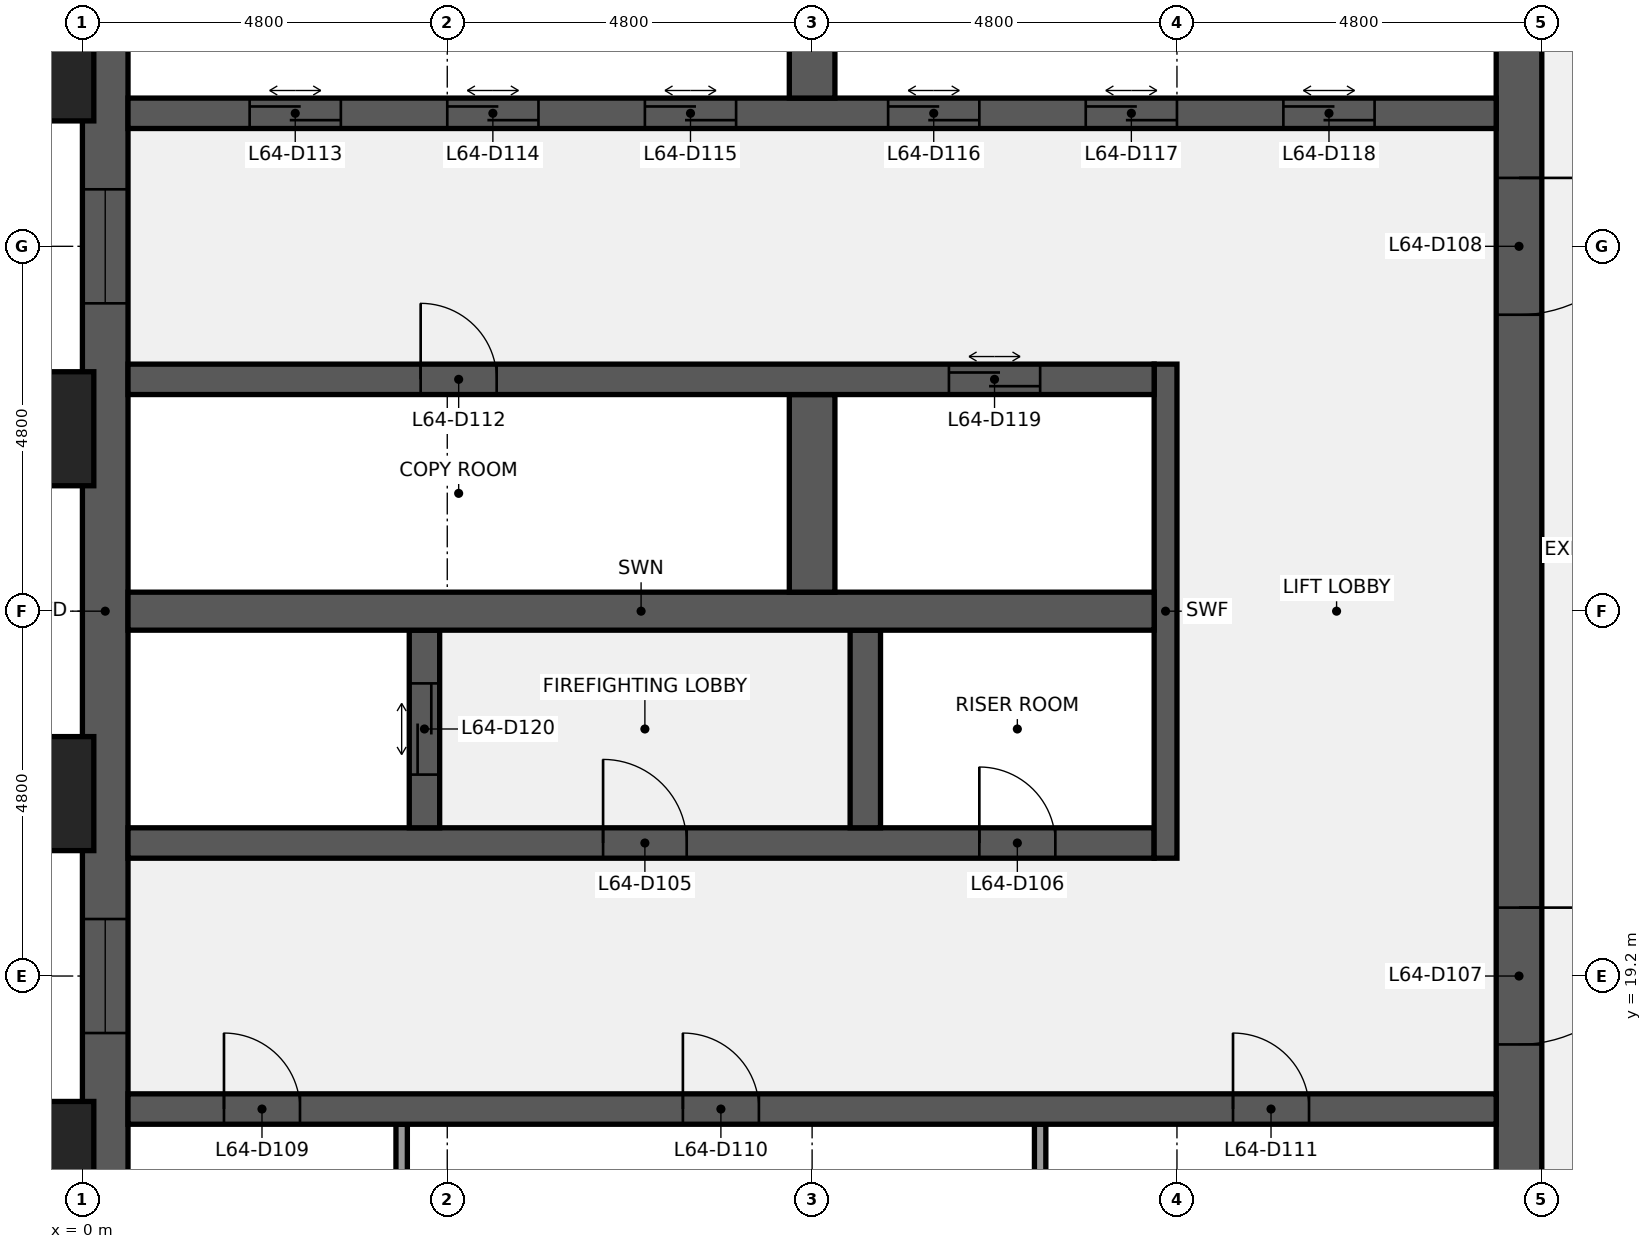
"""IFC4 building model, lengths in metres.
Left out: names, types, materials, properties, quantities, classifications, styles, units other than length and angle.
Written with IfcOpenShell. Run it as: python <this file> out.ifc"""

import sys

from ifc_helpers import new_model, si_unit, direction, frame, frame_2d, origin, origin_2d, place, context, subcontext, project, spatial, rectangle, extrude, element, fill, save


model = new_model("IFC4")
c1 = context("Model", 3, precision=1e-05, world=origin(), true_north=direction((0.0, 1.0)))
c2 = subcontext(c1, "Body", "Model", "MODEL_VIEW")
j1 = project(units=[si_unit("LENGTHUNIT", "METRE"), si_unit("PLANEANGLEUNIT", "RADIAN")], contexts=[c1])
p1 = place(None, origin())
s1 = spatial("IfcSite", under=j1, at=p1, CompositionType="ELEMENT")
p2 = place(p1, origin())
s2 = spatial("IfcBuilding", under=s1, at=p2, CompositionType="ELEMENT")
p3 = place(p2, frame((0.0, 0.0, 294.3)))
s3 = spatial("IfcBuildingStorey", under=s2, at=p3, CompositionType="ELEMENT", Elevation=294.3)
p4 = place(p3, frame((0.3, 9.6, 0.0), z_axis=(0.0, 0.0, 1.0), x_axis=(0.0, 1.0, 0.0)))
e1 = element("IfcWall", 1, at=p4, inside=s3, PredefinedType="SHEAR", context=c2, shape_type="SweptSolid", body=[
    extrude(rectangle(XDim=28.8, YDim=0.6, at=frame_2d((14.4, 0.0))), origin(), (0.0, 0.0, 1.0), 3.84),
])
p5 = place(p4, frame((8.85, 0.0, 0.9)))
e2 = element("IfcOpeningElement", 2, at=p5, cuts=e1, PredefinedType="OPENING", context=c2, shape_type="SweptSolid", body=[
    extrude(rectangle(XDim=1.5, YDim=1.5, at=frame_2d((0.75, 0.75))), frame((0.0, 0.31, 0.0), z_axis=(0.0, -1.0, 0.0), x_axis=(1.0, 0.0, 0.0)), (0.0, 0.0, 1.0), 0.62),
])
p6 = place(p4, frame((18.45, 0.0, 0.9)))
e3 = element("IfcOpeningElement", 3, at=p6, cuts=e1, PredefinedType="OPENING", context=c2, shape_type="SweptSolid", body=[
    extrude(rectangle(XDim=1.5, YDim=1.5, at=frame_2d((0.75, 0.75))), frame((0.0, 0.31, 0.0), z_axis=(0.0, -1.0, 0.0), x_axis=(1.0, 0.0, 0.0)), (0.0, 0.0, 1.0), 0.62),
])
p7 = place(p3, frame((18.9, 38.4, 0.0), z_axis=(0.0, 0.0, 1.0), x_axis=(0.0, -1.0, 0.0)))
e4 = element("IfcWall", 4, at=p7, inside=s3, PredefinedType="SHEAR", context=c2, shape_type="SweptSolid", body=[
    extrude(rectangle(XDim=28.8, YDim=0.6, at=frame_2d((14.4, 0.0))), origin(), (0.0, 0.0, 1.0), 3.84),
])
p8 = place(p7, frame((18.3, 0.0, 0.0)))
e5 = element("IfcOpeningElement", 5, at=p8, cuts=e4, PredefinedType="OPENING", context=c2, shape_type="SweptSolid", body=[
    extrude(rectangle(XDim=1.8, YDim=2.1, at=frame_2d((0.9, 1.05))), frame((0.0, 0.31, 0.0), z_axis=(0.0, -1.0, 0.0), x_axis=(1.0, 0.0, 0.0)), (0.0, 0.0, 1.0), 0.62),
])
p9 = place(p7, frame((8.7, 0.0, 0.0)))
e6 = element("IfcOpeningElement", 6, at=p9, cuts=e4, PredefinedType="OPENING", context=c2, shape_type="SweptSolid", body=[
    extrude(rectangle(XDim=1.8, YDim=2.1, at=frame_2d((0.9, 1.05))), frame((0.0, 0.31, 0.0), z_axis=(0.0, -1.0, 0.0), x_axis=(1.0, 0.0, 0.0)), (0.0, 0.0, 1.0), 0.62),
])
for number, where, z_axis, x_axis in (
    (7, (4.2, 14.65, 0.0), (0.0, 0.0, 1.0), (0.0, 1.0, 0.0)),
    (8, (12.6, 14.65, 0.0), (0.0, 0.0, 1.0), (0.0, 1.0, 0.0)),
):
    element("IfcWall", number, at=place(p3, frame(where, z_axis=z_axis, x_axis=x_axis)), inside=s3, PredefinedType="PARTITIONING", context=c2, shape_type="SweptSolid", body=[
        extrude(rectangle(XDim=2.6, YDim=0.15, at=frame_2d((1.3, 0.0))), origin(), (0.0, 0.0, 1.0), 3.84),
    ])
p10 = place(p3, frame((0.6, 17.45, 0.0), z_axis=(0.0, 0.0, 1.0), x_axis=(1.0, 0.0, 0.0)))
e9 = element("IfcWall", 9, at=p10, inside=s3, PredefinedType="SHEAR", context=c2, shape_type="SweptSolid", body=[
    extrude(rectangle(XDim=18.0, YDim=0.4, at=frame_2d((9.0, 0.0))), origin(), (0.0, 0.0, 1.0), 3.84),
])
p11 = place(p10, frame((1.262, 0.0, 0.0)))
e10 = element("IfcOpeningElement", 10, at=p11, cuts=e9, PredefinedType="OPENING", context=c2, shape_type="SweptSolid", body=[
    extrude(rectangle(XDim=1.0, YDim=2.1, at=frame_2d((0.5, 1.05))), frame((0.0, 0.21, 0.0), z_axis=(0.0, -1.0, 0.0), x_axis=(1.0, 0.0, 0.0)), (0.0, 0.0, 1.0), 0.42),
])
p12 = place(p10, frame((7.3, 0.0, 0.0)))
e11 = element("IfcOpeningElement", 11, at=p12, cuts=e9, PredefinedType="OPENING", context=c2, shape_type="SweptSolid", body=[
    extrude(rectangle(XDim=1.0, YDim=2.1, at=frame_2d((0.5, 1.05))), frame((0.0, 0.21, 0.0), z_axis=(0.0, -1.0, 0.0), x_axis=(1.0, 0.0, 0.0)), (0.0, 0.0, 1.0), 0.42),
])
p13 = place(p10, frame((14.538, 0.0, 0.0)))
e12 = element("IfcOpeningElement", 12, at=p13, cuts=e9, PredefinedType="OPENING", context=c2, shape_type="SweptSolid", body=[
    extrude(rectangle(XDim=1.0, YDim=2.1, at=frame_2d((0.5, 1.05))), frame((0.0, 0.21, 0.0), z_axis=(0.0, -1.0, 0.0), x_axis=(1.0, 0.0, 0.0)), (0.0, 0.0, 1.0), 0.42),
])
p14 = place(p3, frame((0.6, 20.95, 0.0), z_axis=(0.0, 0.0, 1.0), x_axis=(1.0, 0.0, 0.0)))
e13 = element("IfcWall", 13, at=p14, inside=s3, PredefinedType="SHEAR", context=c2, shape_type="SweptSolid", body=[
    extrude(rectangle(XDim=13.5, YDim=0.4, at=frame_2d((6.75, 0.0))), origin(), (0.0, 0.0, 1.0), 3.84),
])
p15 = place(p14, frame((6.25, 0.0, 0.0)))
e14 = element("IfcOpeningElement", 14, at=p15, cuts=e13, PredefinedType="OPENING", context=c2, shape_type="SweptSolid", body=[
    extrude(rectangle(XDim=1.1, YDim=2.1, at=frame_2d((0.55, 1.05))), frame((0.0, 0.21, 0.0), z_axis=(0.0, -1.0, 0.0), x_axis=(1.0, 0.0, 0.0)), (0.0, 0.0, 1.0), 0.42),
])
p16 = place(p14, frame((11.2, 0.0, 0.0)))
e15 = element("IfcOpeningElement", 15, at=p16, cuts=e13, PredefinedType="OPENING", context=c2, shape_type="SweptSolid", body=[
    extrude(rectangle(XDim=1.0, YDim=2.1, at=frame_2d((0.5, 1.05))), frame((0.0, 0.21, 0.0), z_axis=(0.0, -1.0, 0.0), x_axis=(1.0, 0.0, 0.0)), (0.0, 0.0, 1.0), 0.42),
])
p17 = place(p3, frame((14.25, 20.75, 0.0), z_axis=(0.0, 0.0, 1.0), x_axis=(0.0, 1.0, 0.0)))
e16 = element("IfcWall", 16, at=p17, inside=s3, PredefinedType="SHEAR", context=c2, shape_type="SweptSolid", body=[
    extrude(rectangle(XDim=6.5, YDim=0.3, at=frame_2d((3.25, 0.0))), origin(), (0.0, 0.0, 1.0), 3.84),
])
p18 = place(p3, frame((4.5, 21.15, 0.0), z_axis=(0.0, 0.0, 1.0), x_axis=(0.0, 1.0, 0.0)))
e17 = element("IfcWall", 17, at=p18, inside=s3, PredefinedType="SHEAR", context=c2, shape_type="SweptSolid", body=[
    extrude(rectangle(XDim=2.6, YDim=0.4, at=frame_2d((1.3, 0.0))), origin(), (0.0, 0.0, 1.0), 3.84),
])
p19 = place(p18, frame((0.7, 0.0, 0.0)))
e18 = element("IfcOpeningElement", 18, at=p19, cuts=e17, PredefinedType="OPENING", context=c2, shape_type="SweptSolid", body=[
    extrude(rectangle(XDim=1.2, YDim=2.1, at=frame_2d((0.6, 1.05))), frame((0.0, 0.21, 0.0), z_axis=(0.0, -1.0, 0.0), x_axis=(1.0, 0.0, 0.0)), (0.0, 0.0, 1.0), 0.42),
])
p20 = place(p3, frame((10.3, 21.15, 0.0), z_axis=(0.0, 0.0, 1.0), x_axis=(0.0, 1.0, 0.0)))
e19 = element("IfcWall", 19, at=p20, inside=s3, PredefinedType="SHEAR", context=c2, shape_type="SweptSolid", body=[
    extrude(rectangle(XDim=2.6, YDim=0.4, at=frame_2d((1.3, 0.0))), origin(), (0.0, 0.0, 1.0), 3.84),
])
p21 = place(p3, frame((0.6, 24.0, 0.0), z_axis=(0.0, 0.0, 1.0), x_axis=(1.0, 0.0, 0.0)))
e20 = element("IfcWall", 20, at=p21, inside=s3, PredefinedType="SHEAR", context=c2, shape_type="SweptSolid", body=[
    extrude(rectangle(XDim=13.5, YDim=0.5, at=frame_2d((6.75, 0.0))), origin(), (0.0, 0.0, 1.0), 3.84),
])
p22 = place(p3, frame((9.6, 24.25, 0.0), z_axis=(0.0, 0.0, 1.0), x_axis=(0.0, 1.0, 0.0)))
e21 = element("IfcWall", 21, at=p22, inside=s3, PredefinedType="SHEAR", context=c2, shape_type="SweptSolid", body=[
    extrude(rectangle(XDim=2.6, YDim=0.6, at=frame_2d((1.3, 0.0))), origin(), (0.0, 0.0, 1.0), 3.84),
])
p23 = place(p3, frame((0.6, 27.05, 0.0), z_axis=(0.0, 0.0, 1.0), x_axis=(1.0, 0.0, 0.0)))
e22 = element("IfcWall", 22, at=p23, inside=s3, PredefinedType="SHEAR", context=c2, shape_type="SweptSolid", body=[
    extrude(rectangle(XDim=13.5, YDim=0.4, at=frame_2d((6.75, 0.0))), origin(), (0.0, 0.0, 1.0), 3.84),
])
p24 = place(p23, frame((3.85, 0.0, 0.0)))
e23 = element("IfcOpeningElement", 23, at=p24, cuts=e22, PredefinedType="OPENING", context=c2, shape_type="SweptSolid", body=[
    extrude(rectangle(XDim=1.0, YDim=2.1, at=frame_2d((0.5, 1.05))), frame((0.0, 0.21, 0.0), z_axis=(0.0, -1.0, 0.0), x_axis=(1.0, 0.0, 0.0)), (0.0, 0.0, 1.0), 0.42),
])
p25 = place(p23, frame((10.8, 0.0, 0.0)))
e24 = element("IfcOpeningElement", 24, at=p25, cuts=e22, PredefinedType="OPENING", context=c2, shape_type="SweptSolid", body=[
    extrude(rectangle(XDim=1.2, YDim=2.1, at=frame_2d((0.6, 1.05))), frame((0.0, 0.21, 0.0), z_axis=(0.0, -1.0, 0.0), x_axis=(1.0, 0.0, 0.0)), (0.0, 0.0, 1.0), 0.42),
])
p26 = place(p3, frame((0.6, 30.55, 0.0), z_axis=(0.0, 0.0, 1.0), x_axis=(1.0, 0.0, 0.0)))
e25 = element("IfcWall", 25, at=p26, inside=s3, PredefinedType="SHEAR", context=c2, shape_type="SweptSolid", body=[
    extrude(rectangle(XDim=18.0, YDim=0.4, at=frame_2d((9.0, 0.0))), origin(), (0.0, 0.0, 1.0), 3.84),
])
p27 = place(p26, frame((1.6, 0.0, 0.0)))
e26 = element("IfcOpeningElement", 26, at=p27, cuts=e25, PredefinedType="OPENING", context=c2, shape_type="SweptSolid", body=[
    extrude(rectangle(XDim=1.2, YDim=2.1, at=frame_2d((0.6, 1.05))), frame((0.0, 0.21, 0.0), z_axis=(0.0, -1.0, 0.0), x_axis=(1.0, 0.0, 0.0)), (0.0, 0.0, 1.0), 0.42),
])
p28 = place(p26, frame((4.2, 0.0, 0.0)))
e27 = element("IfcOpeningElement", 27, at=p28, cuts=e25, PredefinedType="OPENING", context=c2, shape_type="SweptSolid", body=[
    extrude(rectangle(XDim=1.2, YDim=2.1, at=frame_2d((0.6, 1.05))), frame((0.0, 0.21, 0.0), z_axis=(0.0, -1.0, 0.0), x_axis=(1.0, 0.0, 0.0)), (0.0, 0.0, 1.0), 0.42),
])
p29 = place(p26, frame((6.8, 0.0, 0.0)))
e28 = element("IfcOpeningElement", 28, at=p29, cuts=e25, PredefinedType="OPENING", context=c2, shape_type="SweptSolid", body=[
    extrude(rectangle(XDim=1.2, YDim=2.1, at=frame_2d((0.6, 1.05))), frame((0.0, 0.21, 0.0), z_axis=(0.0, -1.0, 0.0), x_axis=(1.0, 0.0, 0.0)), (0.0, 0.0, 1.0), 0.42),
])
p30 = place(p26, frame((10.0, 0.0, 0.0)))
e29 = element("IfcOpeningElement", 29, at=p30, cuts=e25, PredefinedType="OPENING", context=c2, shape_type="SweptSolid", body=[
    extrude(rectangle(XDim=1.2, YDim=2.1, at=frame_2d((0.6, 1.05))), frame((0.0, 0.21, 0.0), z_axis=(0.0, -1.0, 0.0), x_axis=(1.0, 0.0, 0.0)), (0.0, 0.0, 1.0), 0.42),
])
p31 = place(p26, frame((12.6, 0.0, 0.0)))
e30 = element("IfcOpeningElement", 30, at=p31, cuts=e25, PredefinedType="OPENING", context=c2, shape_type="SweptSolid", body=[
    extrude(rectangle(XDim=1.2, YDim=2.1, at=frame_2d((0.6, 1.05))), frame((0.0, 0.21, 0.0), z_axis=(0.0, -1.0, 0.0), x_axis=(1.0, 0.0, 0.0)), (0.0, 0.0, 1.0), 0.42),
])
p32 = place(p26, frame((15.2, 0.0, 0.0)))
e31 = element("IfcOpeningElement", 31, at=p32, cuts=e25, PredefinedType="OPENING", context=c2, shape_type="SweptSolid", body=[
    extrude(rectangle(XDim=1.2, YDim=2.1, at=frame_2d((0.6, 1.05))), frame((0.0, 0.21, 0.0), z_axis=(0.0, -1.0, 0.0), x_axis=(1.0, 0.0, 0.0)), (0.0, 0.0, 1.0), 0.42),
])
p33 = place(p3, frame((9.6, 30.75, 0.0), z_axis=(0.0, 0.0, 1.0), x_axis=(0.0, 1.0, 0.0)))
e32 = element("IfcWall", 32, at=p33, inside=s3, PredefinedType="SHEAR", context=c2, shape_type="SweptSolid", body=[
    extrude(rectangle(XDim=2.6, YDim=0.6, at=frame_2d((1.3, 0.0))), origin(), (0.0, 0.0, 1.0), 3.84),
])
for number, where, z_axis, x_axis in (
    (33, (-0.75, 16.8, 0.0), (0.0, 0.0, 1.0), (0.0, 1.0, 0.0)),
    (34, (-0.75, 21.6, 0.0), (0.0, 0.0, 1.0), (0.0, 1.0, 0.0)),
    (35, (-0.75, 26.4, 0.0), (0.0, 0.0, 1.0), (0.0, 1.0, 0.0)),
    (36, (-0.75, 31.2, 0.0), (0.0, 0.0, 1.0), (0.0, 1.0, 0.0)),
):
    element("IfcColumn", number, at=place(p3, frame(where, z_axis=z_axis, x_axis=x_axis)), inside=s3, PredefinedType="PILASTER", context=c2, shape_type="SweptSolid", body=[
        extrude(rectangle(XDim=1.8, YDim=1.5, at=origin_2d()), origin(), (0.0, 0.0, 1.0), 4.0),
    ])
p34 = place(p15, origin())
e37 = element("IfcDoor", 37, at=p34, inside=s3, OperationType="SINGLE_SWING_LEFT", PredefinedType="DOOR", context=c2, shape_type="SweptSolid", body=[
    extrude(rectangle(XDim=1.1, YDim=2.1, at=frame_2d((0.55, 1.05))), frame((0.0, 0.025, 0.0), z_axis=(0.0, -1.0, 0.0), x_axis=(1.0, 0.0, 0.0)), (0.0, 0.0, 1.0), 0.05),
])
fill(e14, e37)
p35 = place(p16, origin())
e38 = element("IfcDoor", 38, at=p35, inside=s3, OperationType="SINGLE_SWING_LEFT", PredefinedType="DOOR", context=c2, shape_type="SweptSolid", body=[
    extrude(rectangle(XDim=1.0, YDim=2.1, at=frame_2d((0.5, 1.05))), frame((0.0, 0.025, 0.0), z_axis=(0.0, -1.0, 0.0), x_axis=(1.0, 0.0, 0.0)), (0.0, 0.0, 1.0), 0.05),
])
fill(e15, e38)
p36 = place(p8, origin())
e39 = element("IfcDoor", 39, at=p36, inside=s3, OperationType="DOUBLE_DOOR_SINGLE_SWING", PredefinedType="DOOR", context=c2, shape_type="SweptSolid", body=[
    extrude(rectangle(XDim=1.8, YDim=2.1, at=frame_2d((0.9, 1.05))), frame((0.0, 0.025, 0.0), z_axis=(0.0, -1.0, 0.0), x_axis=(1.0, 0.0, 0.0)), (0.0, 0.0, 1.0), 0.05),
])
fill(e5, e39)
p37 = place(p9, origin())
e40 = element("IfcDoor", 40, at=p37, inside=s3, OperationType="DOUBLE_DOOR_SINGLE_SWING", PredefinedType="DOOR", context=c2, shape_type="SweptSolid", body=[
    extrude(rectangle(XDim=1.8, YDim=2.1, at=frame_2d((0.9, 1.05))), frame((0.0, 0.025, 0.0), z_axis=(0.0, -1.0, 0.0), x_axis=(1.0, 0.0, 0.0)), (0.0, 0.0, 1.0), 0.05),
])
fill(e6, e40)
p38 = place(p11, origin())
e41 = element("IfcDoor", 41, at=p38, inside=s3, OperationType="SINGLE_SWING_LEFT", PredefinedType="DOOR", context=c2, shape_type="SweptSolid", body=[
    extrude(rectangle(XDim=1.0, YDim=2.1, at=frame_2d((0.5, 1.05))), frame((0.0, 0.025, 0.0), z_axis=(0.0, -1.0, 0.0), x_axis=(1.0, 0.0, 0.0)), (0.0, 0.0, 1.0), 0.05),
])
fill(e10, e41)
p39 = place(p12, origin())
e42 = element("IfcDoor", 42, at=p39, inside=s3, OperationType="SINGLE_SWING_LEFT", PredefinedType="DOOR", context=c2, shape_type="SweptSolid", body=[
    extrude(rectangle(XDim=1.0, YDim=2.1, at=frame_2d((0.5, 1.05))), frame((0.0, 0.025, 0.0), z_axis=(0.0, -1.0, 0.0), x_axis=(1.0, 0.0, 0.0)), (0.0, 0.0, 1.0), 0.05),
])
fill(e11, e42)
p40 = place(p13, origin())
e43 = element("IfcDoor", 43, at=p40, inside=s3, OperationType="SINGLE_SWING_LEFT", PredefinedType="DOOR", context=c2, shape_type="SweptSolid", body=[
    extrude(rectangle(XDim=1.0, YDim=2.1, at=frame_2d((0.5, 1.05))), frame((0.0, 0.025, 0.0), z_axis=(0.0, -1.0, 0.0), x_axis=(1.0, 0.0, 0.0)), (0.0, 0.0, 1.0), 0.05),
])
fill(e12, e43)
p41 = place(p24, origin())
e44 = element("IfcDoor", 44, at=p41, inside=s3, OperationType="SINGLE_SWING_LEFT", PredefinedType="DOOR", context=c2, shape_type="SweptSolid", body=[
    extrude(rectangle(XDim=1.0, YDim=2.1, at=frame_2d((0.5, 1.05))), frame((0.0, 0.025, 0.0), z_axis=(0.0, -1.0, 0.0), x_axis=(1.0, 0.0, 0.0)), (0.0, 0.0, 1.0), 0.05),
])
fill(e23, e44)
p42 = place(p27, origin())
e45 = element("IfcDoor", 45, at=p42, inside=s3, OperationType="DOUBLE_DOOR_SLIDING", PredefinedType="DOOR", context=c2, shape_type="SweptSolid", body=[
    extrude(rectangle(XDim=1.2, YDim=2.1, at=frame_2d((0.6, 1.05))), frame((0.0, 0.025, 0.0), z_axis=(0.0, -1.0, 0.0), x_axis=(1.0, 0.0, 0.0)), (0.0, 0.0, 1.0), 0.05),
])
fill(e26, e45)
p43 = place(p28, origin())
e46 = element("IfcDoor", 46, at=p43, inside=s3, OperationType="DOUBLE_DOOR_SLIDING", PredefinedType="DOOR", context=c2, shape_type="SweptSolid", body=[
    extrude(rectangle(XDim=1.2, YDim=2.1, at=frame_2d((0.6, 1.05))), frame((0.0, 0.025, 0.0), z_axis=(0.0, -1.0, 0.0), x_axis=(1.0, 0.0, 0.0)), (0.0, 0.0, 1.0), 0.05),
])
fill(e27, e46)
p44 = place(p29, origin())
e47 = element("IfcDoor", 47, at=p44, inside=s3, OperationType="DOUBLE_DOOR_SLIDING", PredefinedType="DOOR", context=c2, shape_type="SweptSolid", body=[
    extrude(rectangle(XDim=1.2, YDim=2.1, at=frame_2d((0.6, 1.05))), frame((0.0, 0.025, 0.0), z_axis=(0.0, -1.0, 0.0), x_axis=(1.0, 0.0, 0.0)), (0.0, 0.0, 1.0), 0.05),
])
fill(e28, e47)
p45 = place(p30, origin())
e48 = element("IfcDoor", 48, at=p45, inside=s3, OperationType="DOUBLE_DOOR_SLIDING", PredefinedType="DOOR", context=c2, shape_type="SweptSolid", body=[
    extrude(rectangle(XDim=1.2, YDim=2.1, at=frame_2d((0.6, 1.05))), frame((0.0, 0.025, 0.0), z_axis=(0.0, -1.0, 0.0), x_axis=(1.0, 0.0, 0.0)), (0.0, 0.0, 1.0), 0.05),
])
fill(e29, e48)
p46 = place(p31, origin())
e49 = element("IfcDoor", 49, at=p46, inside=s3, OperationType="DOUBLE_DOOR_SLIDING", PredefinedType="DOOR", context=c2, shape_type="SweptSolid", body=[
    extrude(rectangle(XDim=1.2, YDim=2.1, at=frame_2d((0.6, 1.05))), frame((0.0, 0.025, 0.0), z_axis=(0.0, -1.0, 0.0), x_axis=(1.0, 0.0, 0.0)), (0.0, 0.0, 1.0), 0.05),
])
fill(e30, e49)
p47 = place(p32, origin())
e50 = element("IfcDoor", 50, at=p47, inside=s3, OperationType="DOUBLE_DOOR_SLIDING", PredefinedType="DOOR", context=c2, shape_type="SweptSolid", body=[
    extrude(rectangle(XDim=1.2, YDim=2.1, at=frame_2d((0.6, 1.05))), frame((0.0, 0.025, 0.0), z_axis=(0.0, -1.0, 0.0), x_axis=(1.0, 0.0, 0.0)), (0.0, 0.0, 1.0), 0.05),
])
fill(e31, e50)
p48 = place(p25, origin())
e51 = element("IfcDoor", 51, at=p48, inside=s3, OperationType="DOUBLE_DOOR_SLIDING", PredefinedType="DOOR", context=c2, shape_type="SweptSolid", body=[
    extrude(rectangle(XDim=1.2, YDim=2.1, at=frame_2d((0.6, 1.05))), frame((0.0, 0.025, 0.0), z_axis=(0.0, -1.0, 0.0), x_axis=(1.0, 0.0, 0.0)), (0.0, 0.0, 1.0), 0.05),
])
fill(e24, e51)
p49 = place(p19, origin())
e52 = element("IfcDoor", 52, at=p49, inside=s3, OperationType="DOUBLE_DOOR_SLIDING", PredefinedType="DOOR", context=c2, shape_type="SweptSolid", body=[
    extrude(rectangle(XDim=1.2, YDim=2.1, at=frame_2d((0.6, 1.05))), frame((0.0, 0.025, 0.0), z_axis=(0.0, -1.0, 0.0), x_axis=(1.0, 0.0, 0.0)), (0.0, 0.0, 1.0), 0.05),
])
fill(e18, e52)
p50 = place(p5, origin())
e53 = element("IfcWindow", 53, at=p50, inside=s3, PartitioningType="SINGLE_PANEL", PredefinedType="WINDOW", context=c2, shape_type="SweptSolid", body=[
    extrude(rectangle(XDim=1.5, YDim=1.5, at=frame_2d((0.75, 0.75))), frame((0.0, 0.03, 0.0), z_axis=(0.0, -1.0, 0.0), x_axis=(1.0, 0.0, 0.0)), (0.0, 0.0, 1.0), 0.06),
])
fill(e2, e53)
p51 = place(p6, origin())
e54 = element("IfcWindow", 54, at=p51, inside=s3, PartitioningType="SINGLE_PANEL", PredefinedType="WINDOW", context=c2, shape_type="SweptSolid", body=[
    extrude(rectangle(XDim=1.5, YDim=1.5, at=frame_2d((0.75, 0.75))), frame((0.0, 0.03, 0.0), z_axis=(0.0, -1.0, 0.0), x_axis=(1.0, 0.0, 0.0)), (0.0, 0.0, 1.0), 0.06),
])
fill(e3, e54)
save(model, sys.argv[1])
